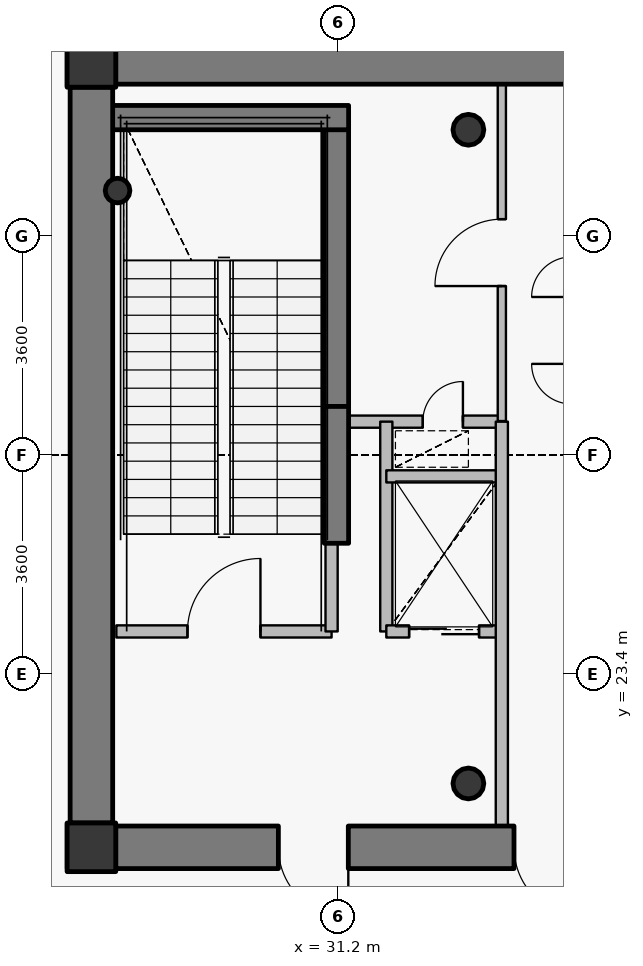
"""IFC4 building model, lengths in metres.
Left out: names, types, materials, properties, quantities, classifications, styles, units other than length and angle.
Written with IfcOpenShell. Run it as: python <this file> out.ifc"""

import sys

from ifc_helpers import new_model, si_unit, direction, frame, frame_2d, origin, origin_2d, place, context, subcontext, project, spatial, rectangle, hollow_circle, extrude, source, transform, mapped, element, fill, save


model = new_model("IFC4")
c1 = context("Model", 3, precision=1e-05, world=origin(), true_north=direction((0.0, 1.0)))
c2 = subcontext(c1, "Body", "Model", "MODEL_VIEW")
j1 = project(units=[si_unit("LENGTHUNIT", "METRE"), si_unit("PLANEANGLEUNIT", "RADIAN")], contexts=[c1])
p1 = place(None, origin())
s1 = spatial("IfcSite", under=j1, at=p1, CompositionType="ELEMENT")
p2 = place(p1, origin())
s2 = spatial("IfcBuilding", under=s1, at=p2, CompositionType="ELEMENT")
p3 = place(p2, frame((0.0, 0.0, 363.6)))
s3 = spatial("IfcBuildingStorey", under=s2, at=p3, CompositionType="ELEMENT", Elevation=363.6)
for number, where, z_axis, x_axis in (
    (1, (27.15, 20.55, 0.0), (0.0, 0.0, 1.0), (1.0, 0.0, 0.0)),
    (2, (27.15, 33.45, 0.0), (0.0, 0.0, 1.0), (1.0, 0.0, 0.0)),
):
    element("IfcColumn", number, at=place(p3, frame(where, z_axis=z_axis, x_axis=x_axis)), inside=s3, PredefinedType="COLUMN", context=c2, shape_type="SweptSolid", body=[
        extrude(rectangle(XDim=0.8, YDim=0.8, at=origin_2d()), origin(), (0.0, 0.0, 1.0), 4.8),
    ])
for number, where, z_axis, x_axis in (
    (3, (33.35, 21.6, 0.0), (0.0, 0.0, 1.0), (1.0, 0.0, 0.0)),
    (4, (33.35, 32.35, 0.0), (0.0, 0.0, 1.0), (1.0, 0.0, 0.0)),
):
    element("IfcColumn", number, at=place(p3, frame(where, z_axis=z_axis, x_axis=x_axis)), inside=s3, PredefinedType="COLUMN", context=c2, shape_type="SweptSolid", body=[
        extrude(hollow_circle(Radius=0.254, WallThickness=0.02, at=origin_2d()), origin(), (0.0, 0.0, 1.0), 4.8),
    ])
p4 = place(p3, frame((31.18, 27.8, 0.0), z_axis=(0.0, 0.0, 1.0), x_axis=(0.0, 1.0, 0.0)))
e5 = element("IfcWall", 5, at=p4, inside=s3, PredefinedType="SHEAR", context=c2, shape_type="SweptSolid", body=[
    extrude(rectangle(XDim=4.75, YDim=0.4, at=frame_2d((2.375, 0.0))), origin(), (0.0, 0.0, 1.0), 4.8),
])
p5 = place(p3, frame((27.25, 32.55, 0.0), z_axis=(0.0, 0.0, 1.0), x_axis=(1.0, 0.0, 0.0)))
e6 = element("IfcWall", 6, at=p5, inside=s3, PredefinedType="SHEAR", context=c2, shape_type="SweptSolid", body=[
    extrude(rectangle(XDim=4.13, YDim=0.4, at=frame_2d((2.065, 0.0))), origin(), (0.0, 0.0, 1.0), 4.8),
])
p6 = place(p3, frame((27.58, 31.35, 0.0), z_axis=(0.0, 0.0, 1.0), x_axis=(1.0, 0.0, 0.0)))
e7 = element("IfcColumn", 7, at=p6, inside=s3, PredefinedType="COLUMN", context=c2, shape_type="SweptSolid", body=[
    extrude(hollow_circle(Radius=0.203, WallThickness=0.016, at=origin_2d()), origin(), (0.0, 0.0, 1.0), 4.8),
])
p7 = place(p3, frame((27.55, 33.45, 0.0), z_axis=(0.0, 0.0, 1.0), x_axis=(1.0, 0.0, 0.0)))
e8 = element("IfcWall", 8, at=p7, inside=s3, PredefinedType="SHEAR", context=c2, shape_type="SweptSolid", body=[
    extrude(rectangle(XDim=16.9, YDim=0.7, at=frame_2d((8.45, 0.0))), origin(), (0.0, 0.0, 1.0), 4.05),
])
p8 = place(p7, frame((12.925, 0.0, 0.0)))
e9 = element("IfcOpeningElement", 9, at=p8, cuts=e8, PredefinedType="OPENING", context=c2, shape_type="SweptSolid", body=[
    extrude(rectangle(XDim=1.15, YDim=2.15, at=origin_2d()), frame((0.575, 0.36, 1.075), z_axis=(0.0, -1.0, 0.0), x_axis=(1.0, 0.0, 0.0)), (0.0, 0.0, 1.0), 0.72),
])
p9 = place(p3, frame((44.45, 20.55, 0.0), z_axis=(0.0, 0.0, 1.0), x_axis=(-1.0, 0.0, 0.0)))
e10 = element("IfcWall", 10, at=p9, inside=s3, PredefinedType="SHEAR", context=c2, shape_type="SweptSolid", body=[
    extrude(rectangle(XDim=16.9, YDim=0.7, at=frame_2d((8.45, 0.0))), origin(), (0.0, 0.0, 1.0), 4.05),
])
p10 = place(p9, frame((13.075, 0.0, 0.0)))
e11 = element("IfcOpeningElement", 11, at=p10, cuts=e10, PredefinedType="OPENING", context=c2, shape_type="SweptSolid", body=[
    extrude(rectangle(XDim=1.15, YDim=2.15, at=origin_2d()), frame((0.575, 0.36, 1.075), z_axis=(0.0, -1.0, 0.0), x_axis=(1.0, 0.0, 0.0)), (0.0, 0.0, 1.0), 0.72),
])
p11 = place(p9, frame((9.2, 0.0, 0.0)))
e12 = element("IfcOpeningElement", 12, at=p11, cuts=e10, PredefinedType="OPENING", context=c2, shape_type="SweptSolid", body=[
    extrude(rectangle(XDim=1.15, YDim=2.15, at=origin_2d()), frame((0.575, 0.36, 1.075), z_axis=(0.0, -1.0, 0.0), x_axis=(1.0, 0.0, 0.0)), (0.0, 0.0, 1.0), 0.72),
])
p12 = place(p3, frame((27.15, 20.95, 0.0), z_axis=(0.0, 0.0, 1.0), x_axis=(0.0, 1.0, 0.0)))
e13 = element("IfcWall", 13, at=p12, inside=s3, PredefinedType="SHEAR", context=c2, shape_type="SweptSolid", body=[
    extrude(rectangle(XDim=12.1, YDim=0.7, at=frame_2d((6.05, 0.0))), origin(), (0.0, 0.0, 1.0), 4.05),
])
p13 = place(p3, frame((31.18, 25.55, 0.0), z_axis=(0.0, 0.0, 1.0), x_axis=(0.0, 1.0, 0.0)))
e14 = element("IfcWall", 14, at=p13, inside=s3, PredefinedType="SHEAR", context=c2, shape_type="SweptSolid", body=[
    extrude(rectangle(XDim=2.25, YDim=0.4, at=frame_2d((1.125, 0.0))), origin(), (0.0, 0.0, 1.0), 4.1),
])
p14 = place(p3, frame((27.56, 24.1, 0.0), z_axis=(0.0, 0.0, 1.0), x_axis=(1.0, 0.0, 0.0)))
e15 = element("IfcWall", 15, at=p14, inside=s3, PredefinedType="PARTITIONING", context=c2, shape_type="SweptSolid", body=[
    extrude(rectangle(XDim=3.54, YDim=0.2, at=frame_2d((1.77, 0.0))), origin(), (0.0, 0.0, 1.0), 4.5),
])
p15 = place(p14, frame((1.17, 0.0, 0.0)))
e16 = element("IfcOpeningElement", 16, at=p15, cuts=e15, PredefinedType="OPENING", context=c2, shape_type="SweptSolid", body=[
    extrude(rectangle(XDim=1.2, YDim=2.15, at=origin_2d()), frame((0.6, 0.11, 1.075), z_axis=(0.0, -1.0, 0.0), x_axis=(1.0, 0.0, 0.0)), (0.0, 0.0, 1.0), 0.22),
])
p16 = place(p3, frame((31.1, 24.1, 0.0), z_axis=(0.0, 0.0, 1.0), x_axis=(0.0, 1.0, 0.0)))
e17 = element("IfcWall", 17, at=p16, inside=s3, PredefinedType="PARTITIONING", context=c2, shape_type="SweptSolid", body=[
    extrude(rectangle(XDim=1.44, YDim=0.2, at=frame_2d((0.72, 0.0))), origin(), (0.0, 0.0, 1.0), 4.5),
])
p17 = place(p3, frame((31.1, 27.55, 0.0), z_axis=(0.0, 0.0, 1.0), x_axis=(1.0, 0.0, 0.0)))
e18 = element("IfcWall", 18, at=p17, inside=s3, PredefinedType="PARTITIONING", context=c2, shape_type="SweptSolid", body=[
    extrude(rectangle(XDim=2.8, YDim=0.2, at=frame_2d((1.4, 0.0))), origin(), (0.0, 0.0, 1.0), 4.085),
])
p18 = place(p17, frame((1.5, 0.0, 0.0)))
e19 = element("IfcOpeningElement", 19, at=p18, cuts=e18, PredefinedType="OPENING", context=c2, shape_type="SweptSolid", body=[
    extrude(rectangle(XDim=0.66, YDim=2.05, at=origin_2d()), frame((0.33, 0.11, 1.025), z_axis=(0.0, -1.0, 0.0), x_axis=(1.0, 0.0, 0.0)), (0.0, 0.0, 1.0), 0.22),
])
p19 = place(p3, frame((32.0, 24.1, 0.0), z_axis=(0.0, 0.0, 1.0), x_axis=(0.0, 1.0, 0.0)))
e20 = element("IfcWall", 20, at=p19, inside=s3, PredefinedType="PARTITIONING", context=c2, shape_type="SweptSolid", body=[
    extrude(rectangle(XDim=3.45, YDim=0.2, at=frame_2d((1.725, 0.0))), origin(), (0.0, 0.0, 1.0), 4.5),
])
p20 = place(p3, frame((32.0, 24.1, 0.0), z_axis=(0.0, 0.0, 1.0), x_axis=(1.0, 0.0, 0.0)))
e21 = element("IfcWall", 21, at=p20, inside=s3, PredefinedType="PARTITIONING", context=c2, shape_type="SweptSolid", body=[
    extrude(rectangle(XDim=1.9, YDim=0.2, at=frame_2d((0.95, 0.0))), origin(), (0.0, 0.0, 1.0), 4.085),
])
p21 = place(p20, frame((0.375, 0.0, 0.0)))
e22 = element("IfcOpeningElement", 22, at=p21, cuts=e21, PredefinedType="OPENING", context=c2, shape_type="SweptSolid", body=[
    extrude(rectangle(XDim=1.15, YDim=2.15, at=origin_2d()), frame((0.575, 0.11, 1.075), z_axis=(0.0, -1.0, 0.0), x_axis=(1.0, 0.0, 0.0)), (0.0, 0.0, 1.0), 0.22),
])
p22 = place(p3, frame((32.0, 26.65, 0.0), z_axis=(0.0, 0.0, 1.0), x_axis=(1.0, 0.0, 0.0)))
e23 = element("IfcWall", 23, at=p22, inside=s3, PredefinedType="PARTITIONING", context=c2, shape_type="SweptSolid", body=[
    extrude(rectangle(XDim=1.9, YDim=0.2, at=frame_2d((0.95, 0.0))), origin(), (0.0, 0.0, 1.0), 4.085),
])
p23 = place(p3, frame((33.9, 20.9, 0.0), z_axis=(0.0, 0.0, 1.0), x_axis=(0.0, 1.0, 0.0)))
e24 = element("IfcWall", 24, at=p23, inside=s3, PredefinedType="PARTITIONING", context=c2, shape_type="SweptSolid", body=[
    extrude(rectangle(XDim=6.65, YDim=0.2, at=frame_2d((3.325, 0.0))), origin(), (0.0, 0.0, 1.0), 4.085),
])
p24 = place(p3, frame((33.9, 27.56, 0.0), z_axis=(0.0, 0.0, 1.0), x_axis=(0.0, 1.0, 0.0)))
e25 = element("IfcWall", 25, at=p24, inside=s3, PredefinedType="PARTITIONING", context=c2, shape_type="SweptSolid", body=[
    extrude(rectangle(XDim=5.54, YDim=0.135, at=frame_2d((2.77, 0.0))), origin(), (0.0, 0.0, 1.0), 4.085),
])
p25 = place(p24, frame((2.22, 0.0, 0.0)))
e26 = element("IfcOpeningElement", 26, at=p25, cuts=e25, PredefinedType="OPENING", context=c2, shape_type="SweptSolid", body=[
    extrude(rectangle(XDim=1.1, YDim=2.15, at=origin_2d()), frame((0.55, 0.078, 1.075), z_axis=(0.0, -1.0, 0.0), x_axis=(1.0, 0.0, 0.0)), (0.0, 0.0, 1.0), 0.155),
])
for number, where, z_axis, x_axis in (
    (27, (26.8, 33.8, 0.0), (0.0, 0.0, 1.0), (0.0, -1.0, 0.0)),
    (28, (26.8, 20.94, 0.0), (0.0, 0.0, 1.0), (0.0, -1.0, 0.0)),
):
    element("IfcWall", number, at=place(p3, frame(where, z_axis=z_axis, x_axis=x_axis)), inside=s3, PredefinedType="PARTITIONING", context=c2, shape_type="SweptSolid", body=[
        extrude(rectangle(XDim=0.74, YDim=0.135, at=frame_2d((0.37, 0.0))), origin(), (0.0, 0.0, 1.0), 3.285),
    ])
p26 = place(p3, frame((27.107, 20.2, 0.0), z_axis=(0.0, 0.0, 1.0), x_axis=(1.0, 0.0, 0.0)))
e29 = element("IfcWall", 29, at=p26, inside=s3, PredefinedType="PARTITIONING", context=c2, shape_type="SweptSolid", body=[
    extrude(rectangle(XDim=0.433, YDim=0.135, at=frame_2d((0.216, 0.0))), origin(), (0.0, 0.0, 1.0), 3.285),
])
m1 = source(origin(), c2, "Body", "SweptSolid", [
    extrude(rectangle(XDim=1.15, YDim=2.15, at=origin_2d()), frame((0.575, 0.025, 1.075), z_axis=(0.0, -1.0, 0.0), x_axis=(1.0, 0.0, 0.0)), (0.0, 0.0, 1.0), 0.05),
])
p27 = place(p10, origin())
e30 = element("IfcDoor", 30, at=p27, inside=s3, OperationType="SINGLE_SWING_LEFT", PredefinedType="DOOR", context=c2, shape_type="MappedRepresentation", body=[
    mapped(m1, transform((0.0, 0.0, 0.0), x_axis=(1.0, 0.0, 0.0), y_axis=(0.0, 1.0, 0.0), z_axis=(0.0, 0.0, 1.0), scale=1.0)),
])
fill(e11, e30)
p28 = place(p11, origin())
e31 = element("IfcDoor", 31, at=p28, inside=s3, OperationType="SINGLE_SWING_LEFT", PredefinedType="DOOR", context=c2, shape_type="MappedRepresentation", body=[
    mapped(m1, transform((0.0, 0.0, 0.0), x_axis=(1.0, 0.0, 0.0), y_axis=(0.0, 1.0, 0.0), z_axis=(0.0, 0.0, 1.0), scale=1.0)),
])
fill(e12, e31)
m2 = source(origin(), c2, "Body", "SweptSolid", [
    extrude(rectangle(XDim=1.2, YDim=2.15, at=origin_2d()), frame((0.6, 0.025, 1.075), z_axis=(0.0, -1.0, 0.0), x_axis=(1.0, 0.0, 0.0)), (0.0, 0.0, 1.0), 0.05),
])
p29 = place(p15, origin())
e32 = element("IfcDoor", 32, at=p29, inside=s3, OperationType="SINGLE_SWING_RIGHT", PredefinedType="DOOR", context=c2, shape_type="MappedRepresentation", body=[
    mapped(m2, transform((0.0, 0.0, 0.0), x_axis=(1.0, 0.0, 0.0), y_axis=(0.0, 1.0, 0.0), z_axis=(0.0, 0.0, 1.0), scale=1.0)),
])
fill(e16, e32)
m3 = source(origin(), c2, "Body", "SweptSolid", [
    extrude(rectangle(XDim=1.15, YDim=2.15, at=origin_2d()), frame((0.575, 0.025, 1.075), z_axis=(0.0, -1.0, 0.0), x_axis=(1.0, 0.0, 0.0)), (0.0, 0.0, 1.0), 0.05),
])
p30 = place(p21, origin())
e33 = element("IfcDoor", 33, at=p30, inside=s3, OperationType="DOUBLE_DOOR_SLIDING", PredefinedType="USERDEFINED", context=c2, shape_type="MappedRepresentation", body=[
    mapped(m3, transform((0.0, 0.0, 0.0), x_axis=(1.0, 0.0, 0.0), y_axis=(0.0, 1.0, 0.0), z_axis=(0.0, 0.0, 1.0), scale=1.0)),
])
fill(e22, e33)
m4 = source(origin(), c2, "Body", "SweptSolid", [
    extrude(rectangle(XDim=1.1, YDim=2.15, at=origin_2d()), frame((0.55, 0.025, 1.075), z_axis=(0.0, -1.0, 0.0), x_axis=(1.0, 0.0, 0.0)), (0.0, 0.0, 1.0), 0.05),
])
p31 = place(p25, origin())
e34 = element("IfcDoor", 34, at=p31, inside=s3, OperationType="SINGLE_SWING_LEFT", PredefinedType="DOOR", context=c2, shape_type="MappedRepresentation", body=[
    mapped(m4, transform((0.0, 0.0, 0.0), x_axis=(1.0, 0.0, 0.0), y_axis=(0.0, 1.0, 0.0), z_axis=(0.0, 0.0, 1.0), scale=1.0)),
])
fill(e26, e34)
m5 = source(origin(), c2, "Body", "SweptSolid", [
    extrude(rectangle(XDim=0.66, YDim=2.05, at=origin_2d()), frame((0.33, 0.025, 1.025), z_axis=(0.0, -1.0, 0.0), x_axis=(1.0, 0.0, 0.0)), (0.0, 0.0, 1.0), 0.05),
])
p32 = place(p18, origin())
e35 = element("IfcDoor", 35, at=p32, inside=s3, OperationType="SINGLE_SWING_RIGHT", PredefinedType="USERDEFINED", context=c2, shape_type="MappedRepresentation", body=[
    mapped(m5, transform((0.0, 0.0, 0.0), x_axis=(1.0, 0.0, 0.0), y_axis=(0.0, 1.0, 0.0), z_axis=(0.0, 0.0, 1.0), scale=1.0)),
])
fill(e19, e35)
save(model, sys.argv[1])
